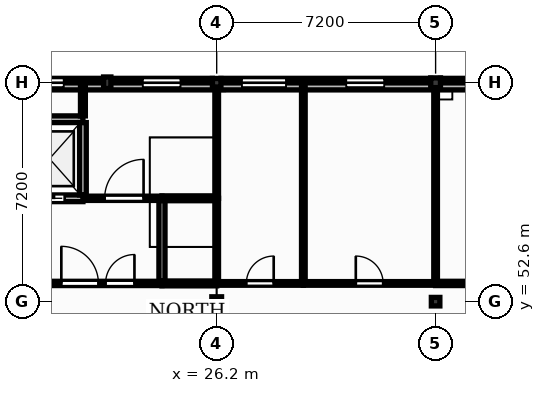
"""IFC4 building model, lengths in metres.
Left out: names, types, materials, properties, quantities, classifications, styles, units other than length and angle.
Written with IfcOpenShell. Run it as: python <this file> out.ifc"""

import sys

from ifc_helpers import new_model, si_unit, direction, frame, frame_2d, origin, origin_2d, place, context, subcontext, project, spatial, polyline, rectangle, outline, extrude, element, fill, save


model = new_model("IFC4")
c1 = context("Model", 3, precision=1e-05, world=origin(), true_north=direction((0.0, 1.0)))
c2 = subcontext(c1, "Body", "Model", "MODEL_VIEW")
j1 = project(units=[si_unit("LENGTHUNIT", "METRE"), si_unit("PLANEANGLEUNIT", "RADIAN")], contexts=[c1])
p1 = place(None, origin())
s1 = spatial("IfcSite", under=j1, at=p1, CompositionType="ELEMENT")
p2 = place(p1, origin())
s2 = spatial("IfcBuilding", under=s1, at=p2, CompositionType="ELEMENT")
p3 = place(p2, frame((0.0, 0.0, 17.4)))
s3 = spatial("IfcBuildingStorey", under=s2, at=p3, CompositionType="ELEMENT", Elevation=17.4)
p4 = place(p3, frame((26.2, 52.6, 0.0), z_axis=(0.0, 0.0, 1.0), x_axis=(1.0, 0.0, 0.0)))
e1 = element("IfcColumn", 1, at=p4, inside=s3, PredefinedType="COLUMN", context=c2, shape_type="SweptSolid", body=[
    extrude(rectangle(XDim=0.32, YDim=0.32, at=origin_2d()), origin(), (0.0, 0.0, 1.0), 3.95),
])
for number, where, z_axis, x_axis in (
    (2, (26.2, 59.8, 0.0), (0.0, 0.0, 1.0), (1.0, 0.0, 0.0)),
    (3, (33.4, 52.6, 0.0), (0.0, 0.0, 1.0), (1.0, 0.0, 0.0)),
):
    element("IfcColumn", number, at=place(p3, frame(where, z_axis=z_axis, x_axis=x_axis)), inside=s3, PredefinedType="COLUMN", context=c2, shape_type="SweptSolid", body=[
        extrude(rectangle(XDim=0.28, YDim=0.28, at=origin_2d()), origin(), (0.0, 0.0, 1.0), 3.95),
    ])
p5 = place(p3, frame((33.4, 59.8, 0.0), z_axis=(0.0, 0.0, 1.0), x_axis=(1.0, 0.0, 0.0)))
e4 = element("IfcColumn", 4, at=p5, inside=s3, PredefinedType="COLUMN", context=c2, shape_type="SweptSolid", body=[
    extrude(rectangle(XDim=0.32, YDim=0.32, at=origin_2d()), origin(), (0.0, 0.0, 1.0), 3.95),
])
p6 = place(p3, frame((22.6, 59.8, 0.0), z_axis=(0.0, 0.0, 1.0), x_axis=(1.0, 0.0, 0.0)))
e5 = element("IfcColumn", 5, at=p6, inside=s3, PredefinedType="PILASTER", context=c2, shape_type="SweptSolid", body=[
    extrude(rectangle(XDim=0.24, YDim=0.38, at=origin_2d()), origin(), (0.0, 0.0, 1.0), 3.95),
])
p7 = place(p3, frame((19.16, 59.8, 0.0), z_axis=(0.0, 0.0, 1.0), x_axis=(1.0, 0.0, 0.0)))
e6 = element("IfcWall", 6, at=p7, inside=s3, PredefinedType="SOLIDWALL", context=c2, shape_type="SweptSolid", body=[
    extrude(rectangle(XDim=3.32, YDim=0.29, at=frame_2d((1.66, 0.0))), origin(), (0.0, 0.0, 1.0), 3.49),
])
p8 = place(p7, frame((0.75, 0.0, 1.05)))
e7 = element("IfcOpeningElement", 7, at=p8, cuts=e6, PredefinedType="OPENING", context=c2, shape_type="SweptSolid", body=[
    extrude(rectangle(XDim=1.26, YDim=1.65, at=frame_2d((0.63, 0.825))), frame((0.0, 0.155, 0.0), z_axis=(0.0, -1.0, 0.0), x_axis=(1.0, 0.0, 0.0)), (0.0, 0.0, 1.0), 0.31),
])
p9 = place(p3, frame((22.72, 59.8, 0.0), z_axis=(0.0, 0.0, 1.0), x_axis=(1.0, 0.0, 0.0)))
e8 = element("IfcWall", 8, at=p9, inside=s3, PredefinedType="SOLIDWALL", context=c2, shape_type="SweptSolid", body=[
    extrude(rectangle(XDim=3.34, YDim=0.29, at=frame_2d((1.67, 0.0))), origin(), (0.0, 0.0, 1.0), 3.49),
])
p10 = place(p9, frame((1.05, 0.0, 1.0)))
e9 = element("IfcOpeningElement", 9, at=p10, cuts=e8, PredefinedType="OPENING", context=c2, shape_type="SweptSolid", body=[
    extrude(rectangle(XDim=1.24, YDim=1.8, at=frame_2d((0.62, 0.9))), frame((0.0, 0.155, 0.0), z_axis=(0.0, -1.0, 0.0), x_axis=(1.0, 0.0, 0.0)), (0.0, 0.0, 1.0), 0.31),
])
p11 = place(p3, frame((26.34, 59.8, 0.0), z_axis=(0.0, 0.0, 1.0), x_axis=(1.0, 0.0, 0.0)))
e10 = element("IfcWall", 10, at=p11, inside=s3, PredefinedType="SOLIDWALL", context=c2, shape_type="SweptSolid", body=[
    extrude(rectangle(XDim=6.9, YDim=0.29, at=frame_2d((3.45, 0.0))), origin(), (0.0, 0.0, 1.0), 3.49),
])
p12 = place(p11, frame((0.69, 0.0, 1.35)))
e11 = element("IfcOpeningElement", 11, at=p12, cuts=e10, PredefinedType="OPENING", context=c2, shape_type="SweptSolid", body=[
    extrude(rectangle(XDim=1.45, YDim=1.4, at=frame_2d((0.725, 0.7))), frame((0.0, 0.155, 0.0), z_axis=(0.0, -1.0, 0.0), x_axis=(1.0, 0.0, 0.0)), (0.0, 0.0, 1.0), 0.31),
])
p13 = place(p11, frame((4.12, 0.0, 1.35)))
e12 = element("IfcOpeningElement", 12, at=p13, cuts=e10, PredefinedType="OPENING", context=c2, shape_type="SweptSolid", body=[
    extrude(rectangle(XDim=1.25, YDim=1.4, at=frame_2d((0.625, 0.7))), frame((0.0, 0.155, 0.0), z_axis=(0.0, -1.0, 0.0), x_axis=(1.0, 0.0, 0.0)), (0.0, 0.0, 1.0), 0.31),
])
p14 = place(p3, frame((33.56, 59.8, 0.0), z_axis=(0.0, 0.0, 1.0), x_axis=(1.0, 0.0, 0.0)))
e13 = element("IfcWall", 13, at=p14, inside=s3, PredefinedType="SOLIDWALL", context=c2, shape_type="SweptSolid", body=[
    extrude(rectangle(XDim=3.32, YDim=0.29, at=frame_2d((1.66, 0.0))), origin(), (0.0, 0.0, 1.0), 3.49),
])
p15 = place(p14, frame((0.83, 0.0, 1.0)))
e14 = element("IfcOpeningElement", 14, at=p15, cuts=e13, PredefinedType="OPENING", context=c2, shape_type="SweptSolid", body=[
    extrude(rectangle(XDim=1.66, YDim=1.8, at=frame_2d((0.83, 0.9))), frame((0.0, 0.155, 0.0), z_axis=(0.0, -1.0, 0.0), x_axis=(1.0, 0.0, 0.0)), (0.0, 0.0, 1.0), 0.31),
])
p16 = place(p3, frame((4.6, 59.68, 4.2), z_axis=(0.0, 0.0, 1.0), x_axis=(1.0, 0.0, 0.0)))
e15 = element("IfcWall", 15, at=p16, inside=s3, PredefinedType="PARAPET", context=c2, shape_type="SweptSolid", body=[
    extrude(outline(polyline([(0.0, 0.0), (50.4, 0.0), (50.4, 0.65), (39.312, 0.925), (39.312, 0.65), (32.256, 1.2), (32.256, 0.925), (18.144, 1.2), (18.144, 0.925), (11.088, 0.925), (11.088, 0.65), (0.0, 0.65), (0.0, 0.0)])), frame((0.0, 0.115, 0.0), z_axis=(0.0, -1.0, 0.0), x_axis=(1.0, 0.0, 0.0)), (0.0, 0.0, 1.0), 0.23),
])
p17 = place(p3, frame((19.6, 56.0, 0.0), z_axis=(0.0, 0.0, 1.0), x_axis=(1.0, 0.0, 0.0)))
e16 = element("IfcWall", 16, at=p17, inside=s3, PredefinedType="SOLIDWALL", context=c2, shape_type="SweptSolid", body=[
    extrude(rectangle(XDim=2.2, YDim=0.22, at=frame_2d((1.1, 0.0))), origin(), (0.0, 0.0, 1.0), 3.95),
])
p18 = place(p17, frame((0.6, 0.0, 0.0)))
e17 = element("IfcOpeningElement", 17, at=p18, cuts=e16, PredefinedType="OPENING", context=c2, shape_type="SweptSolid", body=[
    extrude(rectangle(XDim=1.0, YDim=2.15, at=frame_2d((0.5, 1.075))), frame((0.0, 0.12, 0.0), z_axis=(0.0, -1.0, 0.0), x_axis=(1.0, 0.0, 0.0)), (0.0, 0.0, 1.0), 0.24),
])
p19 = place(p3, frame((19.6, 58.6, 0.0), z_axis=(0.0, 0.0, 1.0), x_axis=(1.0, 0.0, 0.0)))
e18 = element("IfcWall", 18, at=p19, inside=s3, PredefinedType="SOLIDWALL", context=c2, shape_type="SweptSolid", body=[
    extrude(rectangle(XDim=2.2, YDim=0.22, at=frame_2d((1.1, 0.0))), origin(), (0.0, 0.0, 1.0), 3.95),
])
p20 = place(p3, frame((21.8, 56.11, 0.0), z_axis=(0.0, 0.0, 1.0), x_axis=(0.0, 1.0, 0.0)))
e19 = element("IfcWall", 19, at=p20, inside=s3, PredefinedType="SOLIDWALL", context=c2, shape_type="SweptSolid", body=[
    extrude(rectangle(XDim=2.38, YDim=0.22, at=frame_2d((1.19, 0.0))), origin(), (0.0, 0.0, 1.0), 3.95),
])
p21 = place(p3, frame((19.0, 53.2, 0.0), z_axis=(0.0, 0.0, 1.0), x_axis=(1.0, 0.0, 0.0)))
e20 = element("IfcWall", 20, at=p21, inside=s3, PredefinedType="PARTITIONING", context=c2, shape_type="SweptSolid", body=[
    extrude(rectangle(XDim=5.4, YDim=0.14, at=frame_2d((2.7, 0.0))), origin(), (0.0, 0.0, 1.0), 3.93),
])
p22 = place(p21, frame((2.09, 0.0, 0.0)))
e21 = element("IfcOpeningElement", 21, at=p22, cuts=e20, PredefinedType="OPENING", context=c2, shape_type="SweptSolid", body=[
    extrude(rectangle(XDim=1.22, YDim=2.1, at=frame_2d((0.61, 1.05))), frame((0.0, 0.08, 0.0), z_axis=(0.0, -1.0, 0.0), x_axis=(1.0, 0.0, 0.0)), (0.0, 0.0, 1.0), 0.16),
])
p23 = place(p21, frame((3.545, 0.0, 0.0)))
e22 = element("IfcOpeningElement", 22, at=p23, cuts=e20, PredefinedType="OPENING", context=c2, shape_type="SweptSolid", body=[
    extrude(rectangle(XDim=0.95, YDim=2.1, at=frame_2d((0.475, 1.05))), frame((0.0, 0.08, 0.0), z_axis=(0.0, -1.0, 0.0), x_axis=(1.0, 0.0, 0.0)), (0.0, 0.0, 1.0), 0.16),
])
p24 = place(p3, frame((21.91, 56.0, 0.0), z_axis=(0.0, 0.0, 1.0), x_axis=(1.0, 0.0, 0.0)))
e23 = element("IfcWall", 23, at=p24, inside=s3, PredefinedType="PARTITIONING", context=c2, shape_type="SweptSolid", body=[
    extrude(rectangle(XDim=2.49, YDim=0.14, at=frame_2d((1.245, 0.0))), origin(), (0.0, 0.0, 1.0), 3.93),
])
p25 = place(p24, frame((0.605, 0.0, 0.0)))
e24 = element("IfcOpeningElement", 24, at=p25, cuts=e23, PredefinedType="OPENING", context=c2, shape_type="SweptSolid", body=[
    extrude(rectangle(XDim=1.28, YDim=2.2, at=frame_2d((0.64, 1.1))), frame((0.0, 0.08, 0.0), z_axis=(0.0, -1.0, 0.0), x_axis=(1.0, 0.0, 0.0)), (0.0, 0.0, 1.0), 0.16),
])
p26 = place(p3, frame((26.2, 53.2, 0.0), z_axis=(0.0, 0.0, 1.0), x_axis=(1.0, 0.0, 0.0)))
e25 = element("IfcWall", 25, at=p26, inside=s3, PredefinedType="PLUMBINGWALL", context=c2, shape_type="SweptSolid", body=[
    extrude(rectangle(XDim=2.85, YDim=0.12, at=frame_2d((1.425, 0.0))), origin(), (0.0, 0.0, 1.0), 3.93),
])
p27 = place(p26, frame((0.975, 0.0, 0.0)))
e26 = element("IfcOpeningElement", 26, at=p27, cuts=e25, PredefinedType="OPENING", context=c2, shape_type="SweptSolid", body=[
    extrude(rectangle(XDim=0.9, YDim=2.1, at=frame_2d((0.45, 1.05))), frame((0.0, 0.07, 0.0), z_axis=(0.0, -1.0, 0.0), x_axis=(1.0, 0.0, 0.0)), (0.0, 0.0, 1.0), 0.14),
])
p28 = place(p3, frame((26.2, 56.0, 0.0), z_axis=(0.0, 0.0, 1.0), x_axis=(0.0, 1.0, 0.0)))
e27 = element("IfcWall", 27, at=p28, inside=s3, PredefinedType="PLUMBINGWALL", context=c2, shape_type="SweptSolid", body=[
    extrude(rectangle(XDim=3.66, YDim=0.12, at=frame_2d((1.83, 0.0))), origin(), (0.0, 0.0, 1.0), 3.49),
])
p29 = place(p3, frame((29.05, 53.27, 0.0), z_axis=(0.0, 0.0, 1.0), x_axis=(0.0, 1.0, 0.0)))
e28 = element("IfcWall", 28, at=p29, inside=s3, PredefinedType="PLUMBINGWALL", context=c2, shape_type="SweptSolid", body=[
    extrude(rectangle(XDim=6.53, YDim=0.12, at=frame_2d((3.265, 0.0))), origin(), (0.0, 0.0, 1.0), 3.93),
])
p30 = place(p3, frame((29.05, 53.2, 0.0), z_axis=(0.0, 0.0, 1.0), x_axis=(1.0, 0.0, 0.0)))
e29 = element("IfcWall", 29, at=p30, inside=s3, PredefinedType="PLUMBINGWALL", context=c2, shape_type="SweptSolid", body=[
    extrude(rectangle(XDim=4.35, YDim=0.12, at=frame_2d((2.175, 0.0))), origin(), (0.0, 0.0, 1.0), 3.93),
])
p31 = place(p30, frame((1.725, 0.0, 0.0)))
e30 = element("IfcOpeningElement", 30, at=p31, cuts=e29, PredefinedType="OPENING", context=c2, shape_type="SweptSolid", body=[
    extrude(rectangle(XDim=0.9, YDim=2.1, at=frame_2d((0.45, 1.05))), frame((0.0, 0.07, 0.0), z_axis=(0.0, -1.0, 0.0), x_axis=(1.0, 0.0, 0.0)), (0.0, 0.0, 1.0), 0.14),
])
p32 = place(p3, frame((33.4, 53.27, 0.0), z_axis=(0.0, 0.0, 1.0), x_axis=(0.0, 1.0, 0.0)))
e31 = element("IfcWall", 31, at=p32, inside=s3, PredefinedType="PLUMBINGWALL", context=c2, shape_type="SweptSolid", body=[
    extrude(rectangle(XDim=6.37, YDim=0.12, at=frame_2d((3.185, 0.0))), origin(), (0.0, 0.0, 1.0), 3.49),
])
p33 = place(p3, frame((33.4, 53.2, 0.0), z_axis=(0.0, 0.0, 1.0), x_axis=(1.0, 0.0, 0.0)))
e32 = element("IfcWall", 32, at=p33, inside=s3, PredefinedType="PARTITIONING", context=c2, shape_type="SweptSolid", body=[
    extrude(rectangle(XDim=3.845, YDim=0.14, at=frame_2d((1.923, 0.0))), origin(), (0.0, 0.0, 1.0), 3.93),
])
p34 = place(p33, frame((1.282, 0.0, 0.0)))
e33 = element("IfcOpeningElement", 33, at=p34, cuts=e32, PredefinedType="OPENING", context=c2, shape_type="SweptSolid", body=[
    extrude(rectangle(XDim=1.28, YDim=2.2, at=frame_2d((0.64, 1.1))), frame((0.0, 0.08, 0.0), z_axis=(0.0, -1.0, 0.0), x_axis=(1.0, 0.0, 0.0)), (0.0, 0.0, 1.0), 0.16),
])
p35 = place(p3, frame((24.4, 53.27, 0.0), z_axis=(0.0, 0.0, 1.0), x_axis=(0.0, 1.0, 0.0)))
e34 = element("IfcWall", 34, at=p35, inside=s3, PredefinedType="PARTITIONING", context=c2, shape_type="SweptSolid", body=[
    extrude(rectangle(XDim=2.66, YDim=0.2, at=frame_2d((1.33, 0.0))), origin(), (0.0, 0.0, 1.0), 3.93),
])
p36 = place(p3, frame((26.2, 53.2, 0.0), z_axis=(0.0, 0.0, 1.0), x_axis=(-1.0, 0.0, 0.0)))
e35 = element("IfcWall", 35, at=p36, inside=s3, PredefinedType="PARTITIONING", context=c2, shape_type="SweptSolid", body=[
    extrude(rectangle(XDim=1.8, YDim=0.16, at=frame_2d((0.9, 0.0))), origin(), (0.0, 0.0, 1.0), 3.93),
])
p37 = place(p3, frame((26.2, 53.27, 0.0), z_axis=(0.0, 0.0, 1.0), x_axis=(0.0, 1.0, 0.0)))
e36 = element("IfcWall", 36, at=p37, inside=s3, PredefinedType="PLUMBINGWALL", context=c2, shape_type="SweptSolid", body=[
    extrude(rectangle(XDim=2.73, YDim=0.12, at=frame_2d((1.365, 0.0))), origin(), (0.0, 0.0, 1.0), 3.49),
])
p38 = place(p3, frame((24.4, 56.0, 0.0), z_axis=(0.0, 0.0, 1.0), x_axis=(1.0, 0.0, 0.0)))
e37 = element("IfcWall", 37, at=p38, inside=s3, PredefinedType="PARTITIONING", context=c2, shape_type="SweptSolid", body=[
    extrude(rectangle(XDim=1.8, YDim=0.16, at=frame_2d((0.9, 0.0))), origin(), (0.0, 0.0, 1.0), 3.93),
])
p39 = place(p3, frame((21.8, 58.71, 0.0), z_axis=(0.0, 0.0, 1.0), x_axis=(0.0, 1.0, 0.0)))
e38 = element("IfcWall", 38, at=p39, inside=s3, PredefinedType="PARTITIONING", context=c2, shape_type="SweptSolid", body=[
    extrude(rectangle(XDim=1.09, YDim=0.16, at=frame_2d((0.545, 0.0))), origin(), (0.0, 0.0, 1.0), 3.93),
])
p40 = place(p8, origin())
e39 = element("IfcWindow", 39, at=p40, inside=s3, PartitioningType="SINGLE_PANEL", PredefinedType="WINDOW", context=c2, shape_type="SweptSolid", body=[
    extrude(rectangle(XDim=1.26, YDim=1.65, at=frame_2d((0.63, 0.825))), frame((0.0, 0.03, 0.0), z_axis=(0.0, -1.0, 0.0), x_axis=(1.0, 0.0, 0.0)), (0.0, 0.0, 1.0), 0.06),
])
fill(e7, e39)
p41 = place(p10, origin())
e40 = element("IfcWindow", 40, at=p41, inside=s3, PartitioningType="SINGLE_PANEL", PredefinedType="WINDOW", context=c2, shape_type="SweptSolid", body=[
    extrude(rectangle(XDim=1.24, YDim=1.8, at=frame_2d((0.62, 0.9))), frame((0.0, 0.03, 0.0), z_axis=(0.0, -1.0, 0.0), x_axis=(1.0, 0.0, 0.0)), (0.0, 0.0, 1.0), 0.06),
])
fill(e9, e40)
p42 = place(p12, origin())
e41 = element("IfcWindow", 41, at=p42, inside=s3, PartitioningType="SINGLE_PANEL", PredefinedType="WINDOW", context=c2, shape_type="SweptSolid", body=[
    extrude(rectangle(XDim=1.45, YDim=1.4, at=frame_2d((0.725, 0.7))), frame((0.0, 0.03, 0.0), z_axis=(0.0, -1.0, 0.0), x_axis=(1.0, 0.0, 0.0)), (0.0, 0.0, 1.0), 0.06),
])
fill(e11, e41)
p43 = place(p13, origin())
e42 = element("IfcWindow", 42, at=p43, inside=s3, PartitioningType="SINGLE_PANEL", PredefinedType="WINDOW", context=c2, shape_type="SweptSolid", body=[
    extrude(rectangle(XDim=1.25, YDim=1.4, at=frame_2d((0.625, 0.7))), frame((0.0, 0.03, 0.0), z_axis=(0.0, -1.0, 0.0), x_axis=(1.0, 0.0, 0.0)), (0.0, 0.0, 1.0), 0.06),
])
fill(e12, e42)
p44 = place(p15, origin())
e43 = element("IfcWindow", 43, at=p44, inside=s3, PartitioningType="DOUBLE_PANEL_VERTICAL", PredefinedType="WINDOW", context=c2, shape_type="SweptSolid", body=[
    extrude(rectangle(XDim=1.66, YDim=1.8, at=frame_2d((0.83, 0.9))), frame((0.0, 0.03, 0.0), z_axis=(0.0, -1.0, 0.0), x_axis=(1.0, 0.0, 0.0)), (0.0, 0.0, 1.0), 0.06),
])
fill(e14, e43)
p45 = place(p18, origin())
e44 = element("IfcDoor", 44, at=p45, inside=s3, OperationType="SLIDING_TO_LEFT", PredefinedType="DOOR", context=c2, shape_type="SweptSolid", body=[
    extrude(rectangle(XDim=1.0, YDim=2.15, at=frame_2d((0.5, 1.075))), frame((0.0, 0.025, 0.0), z_axis=(0.0, -1.0, 0.0), x_axis=(1.0, 0.0, 0.0)), (0.0, 0.0, 1.0), 0.05),
])
fill(e17, e44)
p46 = place(p22, origin())
e45 = element("IfcDoor", 45, at=p46, inside=s3, OperationType="SINGLE_SWING_LEFT", PredefinedType="DOOR", context=c2, shape_type="SweptSolid", body=[
    extrude(rectangle(XDim=1.22, YDim=2.1, at=frame_2d((0.61, 1.05))), frame((0.0, 0.025, 0.0), z_axis=(0.0, -1.0, 0.0), x_axis=(1.0, 0.0, 0.0)), (0.0, 0.0, 1.0), 0.05),
])
fill(e21, e45)
p47 = place(p23, origin())
e46 = element("IfcDoor", 46, at=p47, inside=s3, OperationType="SINGLE_SWING_RIGHT", PredefinedType="DOOR", context=c2, shape_type="SweptSolid", body=[
    extrude(rectangle(XDim=0.95, YDim=2.1, at=frame_2d((0.475, 1.05))), frame((0.0, 0.025, 0.0), z_axis=(0.0, -1.0, 0.0), x_axis=(1.0, 0.0, 0.0)), (0.0, 0.0, 1.0), 0.05),
])
fill(e22, e46)
p48 = place(p27, origin())
e47 = element("IfcDoor", 47, at=p48, inside=s3, OperationType="SINGLE_SWING_RIGHT", PredefinedType="DOOR", context=c2, shape_type="SweptSolid", body=[
    extrude(rectangle(XDim=0.9, YDim=2.1, at=frame_2d((0.45, 1.05))), frame((0.0, 0.025, 0.0), z_axis=(0.0, -1.0, 0.0), x_axis=(1.0, 0.0, 0.0)), (0.0, 0.0, 1.0), 0.05),
])
fill(e26, e47)
p49 = place(p31, origin())
e48 = element("IfcDoor", 48, at=p49, inside=s3, OperationType="SINGLE_SWING_LEFT", PredefinedType="DOOR", context=c2, shape_type="SweptSolid", body=[
    extrude(rectangle(XDim=0.9, YDim=2.1, at=frame_2d((0.45, 1.05))), frame((0.0, 0.025, 0.0), z_axis=(0.0, -1.0, 0.0), x_axis=(1.0, 0.0, 0.0)), (0.0, 0.0, 1.0), 0.05),
])
fill(e30, e48)
p50 = place(p25, origin())
e49 = element("IfcDoor", 49, at=p50, inside=s3, OperationType="SINGLE_SWING_RIGHT", PredefinedType="DOOR", context=c2, shape_type="SweptSolid", body=[
    extrude(rectangle(XDim=1.28, YDim=2.2, at=frame_2d((0.64, 1.1))), frame((0.0, 0.025, 0.0), z_axis=(0.0, -1.0, 0.0), x_axis=(1.0, 0.0, 0.0)), (0.0, 0.0, 1.0), 0.05),
])
fill(e24, e49)
save(model, sys.argv[1])
